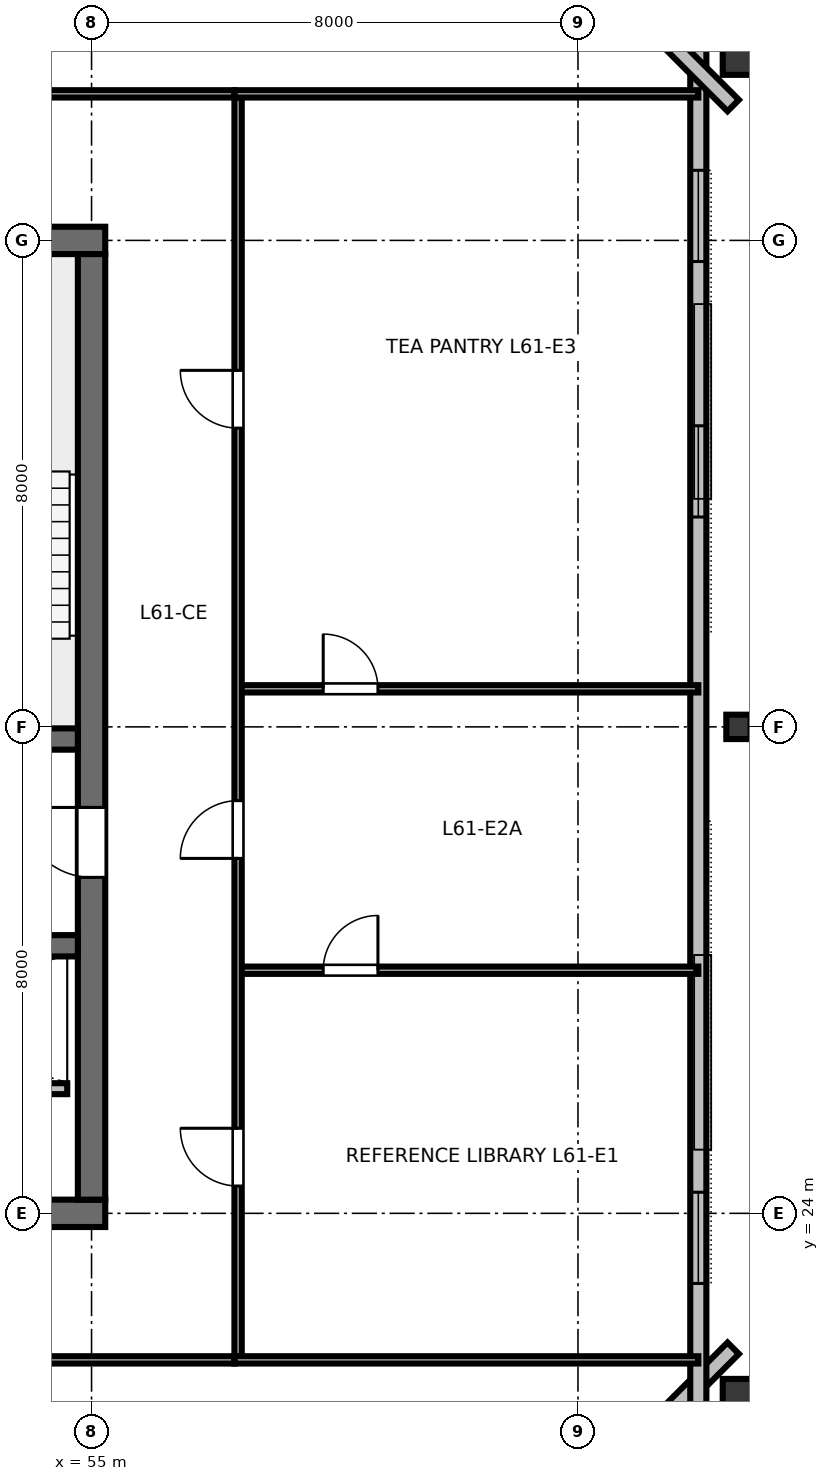
"""IFC4 building model, lengths in metres.
Left out: names, types, materials, properties, quantities, classifications, styles, units other than length and angle.
Written with IfcOpenShell. Run it as: python <this file> out.ifc"""

import sys

from ifc_helpers import new_model, si_unit, direction, frame, frame_2d, origin, origin_2d, place, context, subcontext, project, spatial, rectangle, hollow_rectangle, i_section, extrude, element, fill, save


model = new_model("IFC4")
c1 = context("Model", 3, precision=1e-05, world=origin(), true_north=direction((0.0, 1.0)))
c2 = subcontext(c1, "Body", "Model", "MODEL_VIEW")
j1 = project(units=[si_unit("LENGTHUNIT", "METRE"), si_unit("PLANEANGLEUNIT", "RADIAN")], contexts=[c1])
p1 = place(None, origin())
s1 = spatial("IfcSite", under=j1, at=p1, CompositionType="ELEMENT")
p2 = place(p1, origin())
s2 = spatial("IfcBuilding", under=s1, at=p2, CompositionType="ELEMENT")
p3 = place(p2, frame((0.0, 0.0, 231.0)))
s3 = spatial("IfcBuildingStorey", under=s2, at=p3, CompositionType="ELEMENT", Elevation=231.0)
p4 = place(p3, frame((36.775, 24.0, 0.0), z_axis=(0.0, 0.0, 1.0), x_axis=(1.0, 0.0, 0.0)))
e1 = element("IfcWall", 1, at=p4, inside=s3, PredefinedType="SHEAR", context=c2, shape_type="SweptSolid", body=[
    extrude(rectangle(XDim=18.45, YDim=0.45, at=frame_2d((9.225, 0.0))), origin(), (0.0, 0.0, 1.0), 3.28),
])
p5 = place(p4, frame((13.425, 0.0, 0.0)))
e2 = element("IfcOpeningElement", 2, at=p5, cuts=e1, PredefinedType="OPENING", context=c2, shape_type="SweptSolid", body=[
    extrude(rectangle(XDim=1.6, YDim=2.15, at=frame_2d((0.8, 1.075))), frame((0.0, 0.235, 0.0), z_axis=(0.0, -1.0, 0.0), x_axis=(1.0, 0.0, 0.0)), (0.0, 0.0, 1.0), 0.47),
])
p6 = place(p3, frame((36.775, 40.0, 0.0), z_axis=(0.0, 0.0, 1.0), x_axis=(1.0, 0.0, 0.0)))
e3 = element("IfcWall", 3, at=p6, inside=s3, PredefinedType="SHEAR", context=c2, shape_type="SweptSolid", body=[
    extrude(rectangle(XDim=18.45, YDim=0.45, at=frame_2d((9.225, 0.0))), origin(), (0.0, 0.0, 1.0), 3.28),
])
p7 = place(p6, frame((8.725, 0.0, 0.0)))
e4 = element("IfcOpeningElement", 4, at=p7, cuts=e3, PredefinedType="OPENING", context=c2, shape_type="SweptSolid", body=[
    extrude(rectangle(XDim=1.0, YDim=2.15, at=frame_2d((0.5, 1.075))), frame((0.0, 0.235, 0.0), z_axis=(0.0, -1.0, 0.0), x_axis=(1.0, 0.0, 0.0)), (0.0, 0.0, 1.0), 0.47),
])
p8 = place(p3, frame((55.0, 24.225, 0.0), z_axis=(0.0, 0.0, 1.0), x_axis=(0.0, 1.0, 0.0)))
e5 = element("IfcWall", 5, at=p8, inside=s3, PredefinedType="SHEAR", context=c2, shape_type="SweptSolid", body=[
    extrude(rectangle(XDim=15.55, YDim=0.45, at=frame_2d((7.775, 0.0))), origin(), (0.0, 0.0, 1.0), 3.28),
])
p9 = place(p8, frame((5.3, 0.0, 0.0)))
e6 = element("IfcOpeningElement", 6, at=p9, cuts=e5, PredefinedType="OPENING", context=c2, shape_type="SweptSolid", body=[
    extrude(rectangle(XDim=1.15, YDim=2.15, at=frame_2d((0.575, 1.075))), frame((0.0, 0.235, 0.0), z_axis=(0.0, -1.0, 0.0), x_axis=(1.0, 0.0, 0.0)), (0.0, 0.0, 1.0), 0.47),
])
p10 = place(p3, frame((37.225, 31.8, 0.0), z_axis=(0.0, 0.0, 1.0), x_axis=(1.0, 0.0, 0.0)))
e7 = element("IfcWall", 7, at=p10, inside=s3, PredefinedType="SHEAR", context=c2, shape_type="SweptSolid", body=[
    extrude(rectangle(XDim=17.55, YDim=0.35, at=frame_2d((8.775, 0.0))), origin(), (0.0, 0.0, 1.0), 3.28),
])
p11 = place(p10, frame((0.825, 0.0, 0.0)))
e8 = element("IfcOpeningElement", 8, at=p11, cuts=e7, PredefinedType="OPENING", context=c2, shape_type="SweptSolid", body=[
    extrude(rectangle(XDim=1.1, YDim=2.15, at=frame_2d((0.55, 1.075))), frame((0.0, 0.185, 0.0), z_axis=(0.0, -1.0, 0.0), x_axis=(1.0, 0.0, 0.0)), (0.0, 0.0, 1.0), 0.37),
])
p12 = place(p10, frame((14.725, 0.0, 0.0)))
e9 = element("IfcOpeningElement", 9, at=p12, cuts=e7, PredefinedType="OPENING", context=c2, shape_type="SweptSolid", body=[
    extrude(rectangle(XDim=1.1, YDim=2.15, at=frame_2d((0.55, 1.075))), frame((0.0, 0.185, 0.0), z_axis=(0.0, -1.0, 0.0), x_axis=(1.0, 0.0, 0.0)), (0.0, 0.0, 1.0), 0.37),
])
p13 = place(p3, frame((37.225, 28.4, 0.0), z_axis=(0.0, 0.0, 1.0), x_axis=(1.0, 0.0, 0.0)))
e10 = element("IfcWall", 10, at=p13, inside=s3, PredefinedType="SHEAR", context=c2, shape_type="SweptSolid", body=[
    extrude(rectangle(XDim=17.55, YDim=0.35, at=frame_2d((8.775, 0.0))), origin(), (0.0, 0.0, 1.0), 3.28),
])
p14 = place(p3, frame((65.73, 20.987, 0.0), z_axis=(-0.062492571187, 0.054773773796, 0.996541274735), x_axis=(0.749422115547, -0.656856913627, 0.083099264433)))
e11 = element("IfcColumn", 11, at=p14, inside=s3, PredefinedType="COLUMN", context=c2, shape_type="SweptSolid", body=[
    extrude(hollow_rectangle(XDim=0.58, YDim=0.7, WallThickness=0.032, at=origin_2d()), origin(), (0.0, 0.0, 1.0), 3.29),
])
p15 = place(p3, frame((65.639, 32.0, 0.0), z_axis=(-0.06229035992, 0.0, 0.998058069984), x_axis=(0.998058069984, 0.0, 0.06229035992)))
e12 = element("IfcColumn", 12, at=p15, inside=s3, PredefinedType="COLUMN", context=c2, shape_type="SweptSolid", body=[
    extrude(i_section(OverallWidth=0.401, OverallDepth=0.399, WebThickness=0.025, FlangeThickness=0.04, FilletRadius=0.025, at=origin_2d()), origin(), (0.0, 0.0, 1.0), 3.284),
])
p16 = place(p3, frame((65.73, 43.013, 0.0), z_axis=(-0.062492571187, -0.054773773796, 0.996541274735), x_axis=(0.749422115547, 0.656856913627, 0.083099264433)))
e13 = element("IfcColumn", 13, at=p16, inside=s3, PredefinedType="COLUMN", context=c2, shape_type="SweptSolid", body=[
    extrude(hollow_rectangle(XDim=0.58, YDim=0.7, WallThickness=0.032, at=origin_2d()), origin(), (0.0, 0.0, 1.0), 3.29),
])
p17 = place(p3, frame((58.086, 14.315, 0.0), z_axis=(0.0, 0.0, 1.0), x_axis=(0.707106781187, 0.707106781187, 0.0)))
e14 = element("IfcWall", 14, at=p17, inside=s3, PredefinedType="STANDARD", context=c2, shape_type="SweptSolid", body=[
    extrude(rectangle(XDim=10.56, YDim=0.265, at=frame_2d((5.28, 0.0))), origin(), (0.0, 0.0, 1.0), 2.343),
])
p18 = place(p3, frame((64.979, 20.396, 0.0), z_axis=(0.0, 0.0, 1.0), x_axis=(0.0, 1.0, 0.0)))
e15 = element("IfcWall", 15, at=p18, inside=s3, PredefinedType="STANDARD", context=c2, shape_type="SweptSolid", body=[
    extrude(rectangle(XDim=23.207, YDim=0.265, at=frame_2d((11.604, 0.0))), origin(), (0.0, 0.0, 1.0), 3.28),
])
p19 = place(p18, frame((2.451, 0.0, 0.85)))
e16 = element("IfcOpeningElement", 16, at=p19, cuts=e15, PredefinedType="OPENING", context=c2, shape_type="SweptSolid", body=[
    extrude(rectangle(XDim=1.5, YDim=1.85, at=frame_2d((0.75, 0.925))), frame((0.0, 0.142, 0.0), z_axis=(0.0, -1.0, 0.0), x_axis=(1.0, 0.0, 0.0)), (0.0, 0.0, 1.0), 0.285),
])
p20 = place(p18, frame((15.055, 0.0, 0.85)))
e17 = element("IfcOpeningElement", 17, at=p20, cuts=e15, PredefinedType="OPENING", context=c2, shape_type="SweptSolid", body=[
    extrude(rectangle(XDim=1.5, YDim=1.85, at=frame_2d((0.75, 0.925))), frame((0.0, 0.142, 0.0), z_axis=(0.0, -1.0, 0.0), x_axis=(1.0, 0.0, 0.0)), (0.0, 0.0, 1.0), 0.285),
])
p21 = place(p18, frame((19.257, 0.0, 0.85)))
e18 = element("IfcOpeningElement", 18, at=p21, cuts=e15, PredefinedType="OPENING", context=c2, shape_type="SweptSolid", body=[
    extrude(rectangle(XDim=1.5, YDim=1.85, at=frame_2d((0.75, 0.925))), frame((0.0, 0.142, 0.0), z_axis=(0.0, -1.0, 0.0), x_axis=(1.0, 0.0, 0.0)), (0.0, 0.0, 1.0), 0.285),
])
p22 = place(p3, frame((65.553, 42.218, 0.0), z_axis=(0.0, 0.0, 1.0), x_axis=(-0.707106781187, 0.707106781187, 0.0)))
e19 = element("IfcWall", 19, at=p22, inside=s3, PredefinedType="STANDARD", context=c2, shape_type="SweptSolid", body=[
    extrude(rectangle(XDim=10.56, YDim=0.265, at=frame_2d((5.28, 0.0))), origin(), (0.0, 0.0, 1.0), 2.343),
])
p23 = place(p3, frame((47.6, 26.05, 0.0), z_axis=(0.0, 0.0, 1.0), x_axis=(1.0, 0.0, 0.0)))
e20 = element("IfcWall", 20, at=p23, inside=s3, PredefinedType="PARTITIONING", context=c2, shape_type="SweptSolid", body=[
    extrude(rectangle(XDim=7.0, YDim=0.18, at=frame_2d((3.5, 0.0))), origin(), (0.0, 0.0, 1.0), 3.28),
])
p24 = place(p23, frame((1.2, 0.0, 0.0)))
e21 = element("IfcOpeningElement", 21, at=p24, cuts=e20, PredefinedType="OPENING", context=c2, shape_type="SweptSolid", body=[
    extrude(rectangle(XDim=1.05, YDim=2.15, at=frame_2d((0.525, 1.075))), frame((0.0, 0.1, 0.0), z_axis=(0.0, -1.0, 0.0), x_axis=(1.0, 0.0, 0.0)), (0.0, 0.0, 1.0), 0.2),
])
p25 = place(p23, frame((3.4, 0.0, 0.0)))
e22 = element("IfcOpeningElement", 22, at=p25, cuts=e20, PredefinedType="OPENING", context=c2, shape_type="SweptSolid", body=[
    extrude(rectangle(XDim=1.05, YDim=2.15, at=frame_2d((0.525, 1.075))), frame((0.0, 0.1, 0.0), z_axis=(0.0, -1.0, 0.0), x_axis=(1.0, 0.0, 0.0)), (0.0, 0.0, 1.0), 0.2),
])
p26 = place(p3, frame((47.02, 21.59, 0.0), z_axis=(0.0, 0.0, 1.0), x_axis=(1.0, 0.0, 0.0)))
e23 = element("IfcWall", 23, at=p26, inside=s3, PredefinedType="PARTITIONING", context=c2, shape_type="SweptSolid", body=[
    extrude(rectangle(XDim=10.33, YDim=0.12, at=frame_2d((5.165, 0.0))), origin(), (0.0, 0.0, 1.0), 2.56),
])
p27 = place(p26, frame((4.872, 0.0, 0.0)))
e24 = element("IfcOpeningElement", 24, at=p27, cuts=e23, PredefinedType="OPENING", context=c2, shape_type="SweptSolid", body=[
    extrude(rectangle(XDim=0.95, YDim=2.15, at=frame_2d((0.475, 1.075))), frame((0.0, 0.07, 0.0), z_axis=(0.0, -1.0, 0.0), x_axis=(1.0, 0.0, 0.0)), (0.0, 0.0, 1.0), 0.14),
])
p28 = place(p3, frame((47.02, 42.41, 0.0), z_axis=(0.0, 0.0, 1.0), x_axis=(1.0, 0.0, 0.0)))
e25 = element("IfcWall", 25, at=p28, inside=s3, PredefinedType="PARTITIONING", context=c2, shape_type="SweptSolid", body=[
    extrude(rectangle(XDim=10.33, YDim=0.12, at=frame_2d((5.165, 0.0))), origin(), (0.0, 0.0, 1.0), 2.56),
])
p29 = place(p28, frame((5.62, 0.0, 0.0)))
e26 = element("IfcOpeningElement", 26, at=p29, cuts=e25, PredefinedType="OPENING", context=c2, shape_type="SweptSolid", body=[
    extrude(rectangle(XDim=0.95, YDim=2.15, at=frame_2d((0.475, 1.075))), frame((0.0, 0.07, 0.0), z_axis=(0.0, -1.0, 0.0), x_axis=(1.0, 0.0, 0.0)), (0.0, 0.0, 1.0), 0.14),
])
p30 = place(p3, frame((57.41, 27.998, 0.0), z_axis=(0.0, 0.0, 1.0), x_axis=(1.0, 0.0, 0.0)))
e27 = element("IfcWall", 27, at=p30, inside=s3, PredefinedType="PARTITIONING", context=c2, shape_type="SweptSolid", body=[
    extrude(rectangle(XDim=7.569, YDim=0.12, at=frame_2d((3.785, 0.0))), origin(), (0.0, 0.0, 1.0), 2.56),
])
p31 = place(p30, frame((1.4, 0.0, 0.0)))
e28 = element("IfcOpeningElement", 28, at=p31, cuts=e27, PredefinedType="OPENING", context=c2, shape_type="SweptSolid", body=[
    extrude(rectangle(XDim=0.9, YDim=2.15, at=frame_2d((0.45, 1.075))), frame((0.0, 0.07, 0.0), z_axis=(0.0, -1.0, 0.0), x_axis=(1.0, 0.0, 0.0)), (0.0, 0.0, 1.0), 0.14),
])
p32 = place(p3, frame((57.41, 32.626, 0.0), z_axis=(0.0, 0.0, 1.0), x_axis=(1.0, 0.0, 0.0)))
e29 = element("IfcWall", 29, at=p32, inside=s3, PredefinedType="PARTITIONING", context=c2, shape_type="SweptSolid", body=[
    extrude(rectangle(XDim=7.569, YDim=0.12, at=frame_2d((3.785, 0.0))), origin(), (0.0, 0.0, 1.0), 2.56),
])
p33 = place(p32, frame((1.4, 0.0, 0.0)))
e30 = element("IfcOpeningElement", 30, at=p33, cuts=e29, PredefinedType="OPENING", context=c2, shape_type="SweptSolid", body=[
    extrude(rectangle(XDim=0.9, YDim=2.15, at=frame_2d((0.45, 1.075))), frame((0.0, 0.07, 0.0), z_axis=(0.0, -1.0, 0.0), x_axis=(1.0, 0.0, 0.0)), (0.0, 0.0, 1.0), 0.14),
])
p34 = place(p3, frame((57.41, 21.65, 0.0), z_axis=(0.0, 0.0, 1.0), x_axis=(0.0, 1.0, 0.0)))
e31 = element("IfcWall", 31, at=p34, inside=s3, PredefinedType="PARTITIONING", context=c2, shape_type="SweptSolid", body=[
    extrude(rectangle(XDim=20.7, YDim=0.12, at=frame_2d((10.35, 0.0))), origin(), (0.0, 0.0, 1.0), 2.56),
])
p35 = place(p34, frame((2.799, 0.0, 0.0)))
e32 = element("IfcOpeningElement", 32, at=p35, cuts=e31, PredefinedType="OPENING", context=c2, shape_type="SweptSolid", body=[
    extrude(rectangle(XDim=0.95, YDim=2.15, at=frame_2d((0.475, 1.075))), frame((0.0, 0.07, 0.0), z_axis=(0.0, -1.0, 0.0), x_axis=(1.0, 0.0, 0.0)), (0.0, 0.0, 1.0), 0.14),
])
p36 = place(p34, frame((8.187, 0.0, 0.0)))
e33 = element("IfcOpeningElement", 33, at=p36, cuts=e31, PredefinedType="OPENING", context=c2, shape_type="SweptSolid", body=[
    extrude(rectangle(XDim=0.95, YDim=2.15, at=frame_2d((0.475, 1.075))), frame((0.0, 0.07, 0.0), z_axis=(0.0, -1.0, 0.0), x_axis=(1.0, 0.0, 0.0)), (0.0, 0.0, 1.0), 0.14),
])
p37 = place(p34, frame((15.263, 0.0, 0.0)))
e34 = element("IfcOpeningElement", 34, at=p37, cuts=e31, PredefinedType="OPENING", context=c2, shape_type="SweptSolid", body=[
    extrude(rectangle(XDim=0.95, YDim=2.15, at=frame_2d((0.475, 1.075))), frame((0.0, 0.07, 0.0), z_axis=(0.0, -1.0, 0.0), x_axis=(1.0, 0.0, 0.0)), (0.0, 0.0, 1.0), 0.14),
])
for number, where, z_axis, x_axis in (
    (35, (57.35, 21.59, 0.0), (0.0, 0.0, 1.0), (1.0, 0.0, 0.0)),
    (36, (57.35, 42.41, 0.0), (0.0, 0.0, 1.0), (1.0, 0.0, 0.0)),
):
    element("IfcWall", number, at=place(p3, frame(where, z_axis=z_axis, x_axis=x_axis)), inside=s3, PredefinedType="PARTITIONING", context=c2, shape_type="SweptSolid", body=[
        extrude(rectangle(XDim=7.629, YDim=0.12, at=frame_2d((3.814, 0.0))), origin(), (0.0, 0.0, 1.0), 2.56),
    ])
p38 = place(p19, origin())
e37 = element("IfcWindow", 37, at=p38, inside=s3, PartitioningType="SINGLE_PANEL", PredefinedType="WINDOW", context=c2, shape_type="SweptSolid", body=[
    extrude(rectangle(XDim=1.5, YDim=1.85, at=frame_2d((0.75, 0.925))), frame((0.0, 0.03, 0.0), z_axis=(0.0, -1.0, 0.0), x_axis=(1.0, 0.0, 0.0)), (0.0, 0.0, 1.0), 0.06),
])
fill(e16, e37)
p39 = place(p20, origin())
e38 = element("IfcWindow", 38, at=p39, inside=s3, PartitioningType="SINGLE_PANEL", PredefinedType="WINDOW", context=c2, shape_type="SweptSolid", body=[
    extrude(rectangle(XDim=1.5, YDim=1.85, at=frame_2d((0.75, 0.925))), frame((0.0, 0.03, 0.0), z_axis=(0.0, -1.0, 0.0), x_axis=(1.0, 0.0, 0.0)), (0.0, 0.0, 1.0), 0.06),
])
fill(e17, e38)
p40 = place(p21, origin())
e39 = element("IfcWindow", 39, at=p40, inside=s3, PartitioningType="SINGLE_PANEL", PredefinedType="WINDOW", context=c2, shape_type="SweptSolid", body=[
    extrude(rectangle(XDim=1.5, YDim=1.85, at=frame_2d((0.75, 0.925))), frame((0.0, 0.03, 0.0), z_axis=(0.0, -1.0, 0.0), x_axis=(1.0, 0.0, 0.0)), (0.0, 0.0, 1.0), 0.06),
])
fill(e18, e39)
p41 = place(p9, origin())
e40 = element("IfcDoor", 40, at=p41, inside=s3, OperationType="SINGLE_SWING_RIGHT", PredefinedType="DOOR", context=c2, shape_type="SweptSolid", body=[
    extrude(rectangle(XDim=1.15, YDim=2.15, at=frame_2d((0.575, 1.075))), frame((0.0, 0.025, 0.0), z_axis=(0.0, -1.0, 0.0), x_axis=(1.0, 0.0, 0.0)), (0.0, 0.0, 1.0), 0.05),
])
fill(e6, e40)
p42 = place(p31, origin())
e41 = element("IfcDoor", 41, at=p42, inside=s3, OperationType="SINGLE_SWING_RIGHT", PredefinedType="DOOR", context=c2, shape_type="SweptSolid", body=[
    extrude(rectangle(XDim=0.9, YDim=2.15, at=frame_2d((0.45, 1.075))), frame((0.0, 0.025, 0.0), z_axis=(0.0, -1.0, 0.0), x_axis=(1.0, 0.0, 0.0)), (0.0, 0.0, 1.0), 0.05),
])
fill(e28, e41)
p43 = place(p33, origin())
e42 = element("IfcDoor", 42, at=p43, inside=s3, OperationType="SINGLE_SWING_LEFT", PredefinedType="DOOR", context=c2, shape_type="SweptSolid", body=[
    extrude(rectangle(XDim=0.9, YDim=2.15, at=frame_2d((0.45, 1.075))), frame((0.0, 0.025, 0.0), z_axis=(0.0, -1.0, 0.0), x_axis=(1.0, 0.0, 0.0)), (0.0, 0.0, 1.0), 0.05),
])
fill(e30, e42)
p44 = place(p35, origin())
e43 = element("IfcDoor", 43, at=p44, inside=s3, OperationType="SINGLE_SWING_RIGHT", PredefinedType="DOOR", context=c2, shape_type="SweptSolid", body=[
    extrude(rectangle(XDim=0.95, YDim=2.15, at=frame_2d((0.475, 1.075))), frame((0.0, 0.025, 0.0), z_axis=(0.0, -1.0, 0.0), x_axis=(1.0, 0.0, 0.0)), (0.0, 0.0, 1.0), 0.05),
])
fill(e32, e43)
p45 = place(p36, origin())
e44 = element("IfcDoor", 44, at=p45, inside=s3, OperationType="SINGLE_SWING_LEFT", PredefinedType="DOOR", context=c2, shape_type="SweptSolid", body=[
    extrude(rectangle(XDim=0.95, YDim=2.15, at=frame_2d((0.475, 1.075))), frame((0.0, 0.025, 0.0), z_axis=(0.0, -1.0, 0.0), x_axis=(1.0, 0.0, 0.0)), (0.0, 0.0, 1.0), 0.05),
])
fill(e33, e44)
p46 = place(p37, origin())
e45 = element("IfcDoor", 45, at=p46, inside=s3, OperationType="SINGLE_SWING_RIGHT", PredefinedType="DOOR", context=c2, shape_type="SweptSolid", body=[
    extrude(rectangle(XDim=0.95, YDim=2.15, at=frame_2d((0.475, 1.075))), frame((0.0, 0.025, 0.0), z_axis=(0.0, -1.0, 0.0), x_axis=(1.0, 0.0, 0.0)), (0.0, 0.0, 1.0), 0.05),
])
fill(e34, e45)
save(model, sys.argv[1])
